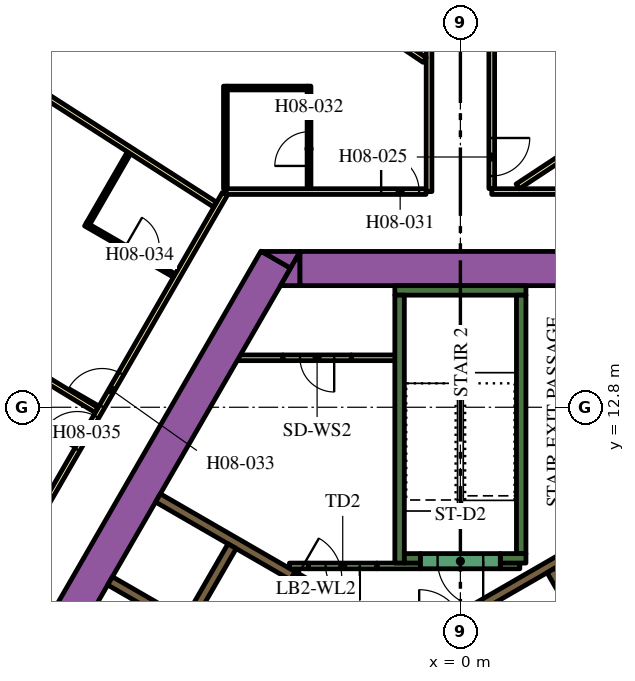
"""IFC4 building model, lengths in metres.
Left out: names, types, materials, properties, quantities, classifications, styles, units other than length and angle.
Written with IfcOpenShell. Run it as: python <this file> out.ifc"""

import sys

from ifc_helpers import new_model, si_unit, direction, frame, frame_2d, origin, place, context, subcontext, project, spatial, polyline, rectangle, outline, extrude, element, fill, save


model = new_model("IFC4")
c1 = context("Model", 3, precision=1e-05, world=origin(), true_north=direction((0.0, 1.0)))
c2 = subcontext(c1, "Body", "Model", "MODEL_VIEW")
j1 = project(units=[si_unit("LENGTHUNIT", "METRE"), si_unit("PLANEANGLEUNIT", "RADIAN")], contexts=[c1])
p1 = place(None, origin())
s1 = spatial("IfcSite", under=j1, at=p1, CompositionType="ELEMENT")
p2 = place(p1, origin())
s2 = spatial("IfcBuilding", under=s1, at=p2, CompositionType="ELEMENT")
p3 = place(p2, frame((0.0, 0.0, 111.0)))
s3 = spatial("IfcBuildingStorey", under=s2, at=p3, CompositionType="ELEMENT", Elevation=111.0)
p4 = place(p3, frame((-15.36, -1.503, 0.0), z_axis=(0.0, 0.0, 1.0), x_axis=(0.50000389221, 0.866023156604, 0.0)))
e1 = element("IfcWall", 1, at=p4, inside=s3, PredefinedType="SOLIDWALL", context=c2, shape_type="SweptSolid", body=[
    extrude(rectangle(XDim=21.0, YDim=0.9, at=frame_2d((10.5, 0.0))), origin(), (0.0, 0.0, 1.0), 3.9),
])
p5 = place(p3, origin())
e2 = element("IfcWall", 2, at=p5, inside=s3, PredefinedType="SOLIDWALL", context=c2, shape_type="SweptSolid", body=[
    extrude(outline(polyline([(-4.215, 16.9), (-4.469, 16.46), (-5.231, 16.9), (-4.215, 16.9)])), origin(), (0.0, 0.0, 1.0), 3.9),
])
p6 = place(p3, frame((-4.224, 16.45, 0.0), z_axis=(0.0, 0.0, 1.0), x_axis=(1.0, 0.0, 0.0)))
e3 = element("IfcWall", 3, at=p6, inside=s3, PredefinedType="SOLIDWALL", context=c2, shape_type="SweptSolid", body=[
    extrude(rectangle(XDim=9.488, YDim=0.9, at=frame_2d((4.744, 0.0))), origin(), (0.0, 0.0, 1.0), 3.9),
])
e4 = element("IfcWall", 4, at=p5, inside=s3, PredefinedType="SOLIDWALL", context=c2, shape_type="SweptSolid", body=[
    extrude(outline(polyline([(-4.734, 16.0), (-4.226, 16.88), (-4.226, 16.0), (-4.734, 16.0)])), origin(), (0.0, 0.0, 1.0), 3.9),
])
p7 = place(p3, frame((-1.725, 15.875, 0.0), z_axis=(0.0, 0.0, 1.0), x_axis=(1.0, 0.0, 0.0)))
e5 = element("IfcWall", 5, at=p7, inside=s3, PredefinedType="SOLIDWALL", context=c2, shape_type="SweptSolid", body=[
    extrude(rectangle(XDim=3.45, YDim=0.25, at=frame_2d((1.725, 0.0))), origin(), (0.0, 0.0, 1.0), 3.9),
])
p8 = place(p3, frame((1.6, 8.95, 0.0), z_axis=(0.0, 0.0, 1.0), x_axis=(0.0, 1.0, 0.0)))
e6 = element("IfcWall", 6, at=p8, inside=s3, PredefinedType="SOLIDWALL", context=c2, shape_type="SweptSolid", body=[
    extrude(rectangle(XDim=6.8, YDim=0.25, at=frame_2d((3.4, 0.0))), origin(), (0.0, 0.0, 1.0), 3.9),
])
p9 = place(p3, frame((1.05, 8.825, 0.0), z_axis=(0.0, 0.0, 1.0), x_axis=(1.0, 0.0, 0.0)))
e7 = element("IfcWall", 7, at=p9, inside=s3, PredefinedType="SOLIDWALL", context=c2, shape_type="SweptSolid", body=[
    extrude(rectangle(XDim=0.675, YDim=0.25, at=frame_2d((0.337, 0.0))), origin(), (0.0, 0.0, 1.0), 3.9),
])
p10 = place(p3, frame((-1.6, 8.7, 0.0), z_axis=(0.0, 0.0, 1.0), x_axis=(0.0, 1.0, 0.0)))
e8 = element("IfcWall", 8, at=p10, inside=s3, PredefinedType="SOLIDWALL", context=c2, shape_type="SweptSolid", body=[
    extrude(rectangle(XDim=7.05, YDim=0.25, at=frame_2d((3.525, 0.0))), origin(), (0.0, 0.0, 1.0), 3.9),
])
p11 = place(p3, frame((-1.475, 8.825, 0.0), z_axis=(0.0, 0.0, 1.0), x_axis=(1.0, 0.0, 0.0)))
e9 = element("IfcWall", 9, at=p11, inside=s3, PredefinedType="SOLIDWALL", context=c2, shape_type="SweptSolid", body=[
    extrude(rectangle(XDim=0.425, YDim=0.25, at=frame_2d((0.212, 0.0))), origin(), (0.0, 0.0, 1.0), 3.9),
])
p12 = place(p3, frame((0.314, 7.456, 0.0), z_axis=(0.0, 0.0, 1.0), x_axis=(0.866013897511, 0.50001992892, 0.0)))
e10 = element("IfcWall", 10, at=p12, inside=s3, PredefinedType="SOLIDWALL", context=c2, shape_type="SweptSolid", body=[
    extrude(rectangle(XDim=3.268, YDim=0.25, at=frame_2d((1.634, 0.0))), origin(), (0.0, 0.0, 1.0), 3.9),
])
e11 = element("IfcWall", 11, at=p5, inside=s3, PredefinedType="SOLIDWALL", context=c2, shape_type="SweptSolid", body=[
    extrude(outline(polyline([(-3.128, 7.481), (-3.259, 7.557), (-3.134, 7.773), (-3.003, 7.698), (-3.128, 7.481)])), origin(), (0.0, 0.0, 1.0), 3.9),
])
p13 = place(p3, frame((-7.314, 7.132, 0.0), z_axis=(0.0, 0.0, 1.0), x_axis=(-0.866008176907, 0.50002983664, 0.0)))
e12 = element("IfcWall", 12, at=p13, inside=s3, PredefinedType="SOLIDWALL", context=c2, shape_type="SweptSolid", body=[
    extrude(rectangle(XDim=2.2, YDim=0.25, at=frame_2d((1.1, 0.0))), origin(), (0.0, 0.0, 1.0), 3.9),
])
p14 = place(p3, frame((-7.959, 10.415, 0.0), z_axis=(0.0, 0.0, 1.0), x_axis=(0.866020958405, -0.500007699544, 0.0)))
e13 = element("IfcWall", 13, at=p14, inside=s3, PredefinedType="SOLIDWALL", context=c2, shape_type="SweptSolid", body=[
    extrude(rectangle(XDim=4.1, YDim=0.25, at=frame_2d((2.05, 0.0))), origin(), (0.0, 0.0, 1.0), 3.9),
])
p15 = place(p3, frame((-3.997, 8.625, 0.0), z_axis=(0.0, 0.0, 1.0), x_axis=(-1.0, 0.0, 0.0)))
e14 = element("IfcWall", 14, at=p15, inside=s3, PredefinedType="PARTITIONING", context=c2, shape_type="SweptSolid", body=[
    extrude(rectangle(XDim=0.502, YDim=0.15, at=frame_2d((0.251, 0.0))), origin(), (0.0, 0.0, 1.0), 2.75),
])
p16 = place(p3, frame((-2.196, 8.625, 0.0), z_axis=(0.0, 0.0, 1.0), x_axis=(1.0, 0.0, 0.0)))
e15 = element("IfcWall", 15, at=p16, inside=s3, PredefinedType="PARTITIONING", context=c2, shape_type="SweptSolid", body=[
    extrude(rectangle(XDim=1.146, YDim=0.15, at=frame_2d((0.573, 0.0))), origin(), (0.0, 0.0, 1.0), 2.75),
])
p17 = place(p3, frame((-5.851, 14.102, 0.0), z_axis=(0.0, 0.0, 1.0), x_axis=(1.0, 0.0, 0.0)))
e16 = element("IfcWall", 16, at=p17, inside=s3, PredefinedType="PARTITIONING", context=c2, shape_type="SweptSolid", body=[
    extrude(rectangle(XDim=1.18, YDim=0.15, at=frame_2d((0.59, 0.0))), origin(), (0.0, 0.0, 1.0), 2.75),
])
p18 = place(p3, frame((-2.871, 14.102, 0.0), z_axis=(0.0, 0.0, 1.0), x_axis=(1.0, 0.0, 0.0)))
e17 = element("IfcWall", 17, at=p18, inside=s3, PredefinedType="PARTITIONING", context=c2, shape_type="SweptSolid", body=[
    extrude(rectangle(XDim=1.196, YDim=0.15, at=frame_2d((0.598, 0.0))), origin(), (0.0, 0.0, 1.0), 2.75),
])
p19 = place(p3, frame((1.05, 8.625, 0.0), z_axis=(0.0, 0.0, 1.0), x_axis=(1.0, 0.0, 0.0)))
e18 = element("IfcWall", 18, at=p19, inside=s3, PredefinedType="PARTITIONING", context=c2, shape_type="SweptSolid", body=[
    extrude(rectangle(XDim=0.514, YDim=0.15, at=frame_2d((0.257, 0.0))), origin(), (0.0, 0.0, 1.0), 2.75),
])
p20 = place(p3, frame((8.565, -2.185, 0.0), z_axis=(0.0, 0.0, 1.0), x_axis=(-0.499997954832, 0.866026584559, 0.0)))
e19 = element("IfcWall", 19, at=p20, inside=s3, PredefinedType="SOLIDWALL", context=c2, shape_type="SweptSolid", body=[
    extrude(rectangle(XDim=12.35, YDim=0.25, at=frame_2d((6.175, 0.0))), origin(), (0.0, 0.0, 1.0), 3.9),
])
p21 = place(p20, frame((5.725, 0.0, 0.0)))
e20 = element("IfcOpeningElement", 20, at=p21, cuts=e19, PredefinedType="OPENING", context=c2, shape_type="SweptSolid", body=[
    extrude(rectangle(XDim=0.9, YDim=2.1, at=frame_2d((0.45, 1.05))), frame((0.0, 0.135, 0.0), z_axis=(0.0, -1.0, 0.0), x_axis=(1.0, 0.0, 0.0)), (0.0, 0.0, 1.0), 0.27),
])
p22 = place(p3, frame((-6.008, 9.144, 0.0), z_axis=(0.0, 0.0, 1.0), x_axis=(-0.500006956611, -0.866021387346, 0.0)))
e21 = element("IfcWall", 21, at=p22, inside=s3, PredefinedType="SOLIDWALL", context=c2, shape_type="SweptSolid", body=[
    extrude(rectangle(XDim=9.83, YDim=0.25, at=frame_2d((4.915, 0.0))), origin(), (0.0, 0.0, 1.0), 3.9),
])
p23 = place(p22, frame((6.985, 0.0, 0.0)))
e22 = element("IfcOpeningElement", 22, at=p23, cuts=e21, PredefinedType="OPENING", context=c2, shape_type="SweptSolid", body=[
    extrude(rectangle(XDim=0.9, YDim=2.1, at=frame_2d((0.45, 1.05))), frame((0.0, 0.135, 0.0), z_axis=(0.0, -1.0, 0.0), x_axis=(1.0, 0.0, 0.0)), (0.0, 0.0, 1.0), 0.27),
])
p24 = place(p3, frame((1.05, 8.75, 0.0), z_axis=(0.0, 0.0, 1.0), x_axis=(-1.0, 0.0, 0.0)))
e23 = element("IfcWall", 23, at=p24, inside=s3, PredefinedType="SOLIDWALL", context=c2, shape_type="SweptSolid", body=[
    extrude(rectangle(XDim=2.1, YDim=0.4, at=frame_2d((1.05, 0.0))), origin(), (0.0, 0.0, 1.0), 3.9),
])
p25 = place(p24, frame((0.45, 0.0, 0.0)))
e24 = element("IfcOpeningElement", 24, at=p25, cuts=e23, PredefinedType="OPENING", context=c2, shape_type="SweptSolid", body=[
    extrude(rectangle(XDim=1.2, YDim=2.1, at=frame_2d((0.6, 1.05))), frame((0.0, 0.21, 0.0), z_axis=(0.0, -1.0, 0.0), x_axis=(1.0, 0.0, 0.0)), (0.0, 0.0, 1.0), 0.42),
])
p26 = place(p3, frame((-2.196, 8.625, 0.0), z_axis=(0.0, 0.0, 1.0), x_axis=(-1.0, 0.0, 0.0)))
e25 = element("IfcWall", 25, at=p26, inside=s3, PredefinedType="PARTITIONING", context=c2, shape_type="SweptSolid", body=[
    extrude(rectangle(XDim=1.8, YDim=0.15, at=frame_2d((0.9, 0.0))), origin(), (0.0, 0.0, 1.0), 2.75),
])
p27 = place(p26, frame((0.45, 0.0, 0.0)))
e26 = element("IfcOpeningElement", 26, at=p27, cuts=e25, PredefinedType="OPENING", context=c2, shape_type="SweptSolid", body=[
    extrude(rectangle(XDim=0.9, YDim=2.1, at=frame_2d((0.45, 1.05))), frame((0.0, 0.085, 0.0), z_axis=(0.0, -1.0, 0.0), x_axis=(1.0, 0.0, 0.0)), (0.0, 0.0, 1.0), 0.17),
])
p28 = place(p3, frame((-4.409, 8.365, 0.0), z_axis=(0.0, 0.0, 1.0), x_axis=(0.866034573852, -0.49998411664, 0.0)))
e27 = element("IfcWall", 27, at=p28, inside=s3, PredefinedType="SOLIDWALL", context=c2, shape_type="SweptSolid", body=[
    extrude(rectangle(XDim=1.4, YDim=0.25, at=frame_2d((0.7, 0.0))), origin(), (0.0, 0.0, 1.0), 3.9),
])
p29 = place(p28, frame((0.1, 0.0, 0.0)))
e28 = element("IfcOpeningElement", 28, at=p29, cuts=e27, PredefinedType="OPENING", context=c2, shape_type="SweptSolid", body=[
    extrude(rectangle(XDim=1.2, YDim=2.1, at=frame_2d((0.6, 1.05))), frame((0.0, 0.135, 0.0), z_axis=(0.0, -1.0, 0.0), x_axis=(1.0, 0.0, 0.0)), (0.0, 0.0, 1.0), 0.27),
])
p30 = place(p3, frame((-2.871, 14.102, 0.0), z_axis=(0.0, 0.0, 1.0), x_axis=(-1.0, 0.0, 0.0)))
e29 = element("IfcWall", 29, at=p30, inside=s3, PredefinedType="PARTITIONING", context=c2, shape_type="SweptSolid", body=[
    extrude(rectangle(XDim=1.8, YDim=0.15, at=frame_2d((0.9, 0.0))), origin(), (0.0, 0.0, 1.0), 2.75),
])
p31 = place(p30, frame((0.45, 0.0, 0.0)))
e30 = element("IfcOpeningElement", 30, at=p31, cuts=e29, PredefinedType="OPENING", context=c2, shape_type="SweptSolid", body=[
    extrude(rectangle(XDim=0.9, YDim=2.1, at=frame_2d((0.45, 1.05))), frame((0.0, 0.085, 0.0), z_axis=(0.0, -1.0, 0.0), x_axis=(1.0, 0.0, 0.0)), (0.0, 0.0, 1.0), 0.17),
])
p32 = place(p3, frame((0.825, 18.475, 0.0), z_axis=(0.0, 0.0, 1.0), x_axis=(1.0, 0.0, 0.0)))
e31 = element("IfcWall", 31, at=p32, inside=s3, PredefinedType="PARTITIONING", context=c2, shape_type="SweptSolid", body=[
    extrude(rectangle(XDim=5.268, YDim=0.15, at=frame_2d((2.634, 0.0))), origin(), (0.0, 0.0, 1.0), 2.75),
])
p33 = place(p3, frame((0.825, 32.098, 0.0), z_axis=(0.0, 0.0, 1.0), x_axis=(0.0, -1.0, 0.0)))
e32 = element("IfcWall", 32, at=p33, inside=s3, PredefinedType="PARTITIONING", context=c2, shape_type="SweptSolid", body=[
    extrude(rectangle(XDim=13.543, YDim=0.15, at=frame_2d((6.772, 0.0))), origin(), (0.0, 0.0, 1.0), 2.75),
])
p34 = place(p33, frame((12.213, 0.0, 0.0)))
e33 = element("IfcOpeningElement", 33, at=p34, cuts=e32, PredefinedType="OPENING", context=c2, shape_type="SweptSolid", body=[
    extrude(rectangle(XDim=1.0, YDim=2.1, at=frame_2d((0.5, 1.05))), frame((0.0, 0.085, 0.0), z_axis=(0.0, -1.0, 0.0), x_axis=(1.0, 0.0, 0.0)), (0.0, 0.0, 1.0), 0.17),
])
p35 = place(p33, frame((4.65, 0.0, 0.0)))
e34 = element("IfcOpeningElement", 34, at=p35, cuts=e32, PredefinedType="OPENING", context=c2, shape_type="SweptSolid", body=[
    extrude(rectangle(XDim=1.0, YDim=2.1, at=frame_2d((0.5, 1.05))), frame((0.0, 0.085, 0.0), z_axis=(0.0, -1.0, 0.0), x_axis=(1.0, 0.0, 0.0)), (0.0, 0.0, 1.0), 0.17),
])
p36 = place(p3, frame((-0.825, 18.475, 0.0), z_axis=(0.0, 0.0, 1.0), x_axis=(0.0, 1.0, 0.0)))
e35 = element("IfcWall", 35, at=p36, inside=s3, PredefinedType="PARTITIONING", context=c2, shape_type="SweptSolid", body=[
    extrude(rectangle(XDim=13.623, YDim=0.15, at=frame_2d((6.812, 0.0))), origin(), (0.0, 0.0, 1.0), 2.75),
])
p37 = place(p36, frame((4.135, 0.0, 0.0)))
e36 = element("IfcOpeningElement", 36, at=p37, cuts=e35, PredefinedType="OPENING", context=c2, shape_type="SweptSolid", body=[
    extrude(rectangle(XDim=1.1, YDim=2.1, at=frame_2d((0.55, 1.05))), frame((0.0, 0.085, 0.0), z_axis=(0.0, -1.0, 0.0), x_axis=(1.0, 0.0, 0.0)), (0.0, 0.0, 1.0), 0.17),
])
p38 = place(p3, frame((-6.163, 18.475, 0.0), z_axis=(0.0, 0.0, 1.0), x_axis=(1.0, 0.0, 0.0)))
e37 = element("IfcWall", 37, at=p38, inside=s3, PredefinedType="PARTITIONING", context=c2, shape_type="SweptSolid", body=[
    extrude(rectangle(XDim=5.258, YDim=0.15, at=frame_2d((2.629, 0.0))), origin(), (0.0, 0.0, 1.0), 2.75),
])
p39 = place(p38, frame((4.078, 0.0, 0.0)))
e38 = element("IfcOpeningElement", 38, at=p39, cuts=e37, PredefinedType="OPENING", context=c2, shape_type="SweptSolid", body=[
    extrude(rectangle(XDim=1.0, YDim=2.1, at=frame_2d((0.5, 1.05))), frame((0.0, 0.085, 0.0), z_axis=(0.0, -1.0, 0.0), x_axis=(1.0, 0.0, 0.0)), (0.0, 0.0, 1.0), 0.17),
])
p40 = place(p3, frame((-19.081, -3.9, 0.0), z_axis=(0.0, 0.0, 1.0), x_axis=(0.499998313975, 0.866026377209, 0.0)))
e39 = element("IfcWall", 39, at=p40, inside=s3, PredefinedType="PARTITIONING", context=c2, shape_type="SweptSolid", body=[
    extrude(rectangle(XDim=25.766, YDim=0.15, at=frame_2d((12.883, 0.0))), origin(), (0.0, 0.0, 1.0), 2.75),
])
p41 = place(p40, frame((19.306, 0.0, 0.0)))
e40 = element("IfcOpeningElement", 40, at=p41, cuts=e39, PredefinedType="OPENING", context=c2, shape_type="SweptSolid", body=[
    extrude(rectangle(XDim=1.0, YDim=2.1, at=frame_2d((0.5, 1.05))), frame((0.0, 0.085, 0.0), z_axis=(0.0, -1.0, 0.0), x_axis=(1.0, 0.0, 0.0)), (0.0, 0.0, 1.0), 0.17),
])
p42 = place(p40, frame((18.0, 0.0, 0.0)))
e41 = element("IfcOpeningElement", 41, at=p42, cuts=e39, PredefinedType="OPENING", context=c2, shape_type="SweptSolid", body=[
    extrude(rectangle(XDim=1.0, YDim=2.1, at=frame_2d((0.5, 1.05))), frame((0.0, 0.085, 0.0), z_axis=(0.0, -1.0, 0.0), x_axis=(1.0, 0.0, 0.0)), (0.0, 0.0, 1.0), 0.17),
])
p43 = place(p40, frame((6.838, 0.0, 0.0)))
e42 = element("IfcOpeningElement", 42, at=p43, cuts=e39, PredefinedType="OPENING", context=c2, shape_type="SweptSolid", body=[
    extrude(rectangle(XDim=1.0, YDim=2.1, at=frame_2d((0.5, 1.05))), frame((0.0, 0.085, 0.0), z_axis=(0.0, -1.0, 0.0), x_axis=(1.0, 0.0, 0.0)), (0.0, 0.0, 1.0), 0.17),
])
p44 = place(p40, frame((4.674, 0.0, 0.0)))
e43 = element("IfcOpeningElement", 43, at=p44, cuts=e39, PredefinedType="OPENING", context=c2, shape_type="SweptSolid", body=[
    extrude(rectangle(XDim=0.9, YDim=2.1, at=frame_2d((0.45, 1.05))), frame((0.0, 0.085, 0.0), z_axis=(0.0, -1.0, 0.0), x_axis=(1.0, 0.0, 0.0)), (0.0, 0.0, 1.0), 0.17),
])
p45 = place(p40, frame((0.18, 0.0, 0.0)))
e44 = element("IfcOpeningElement", 44, at=p45, cuts=e39, PredefinedType="OPENING", context=c2, shape_type="SweptSolid", body=[
    extrude(rectangle(XDim=1.0, YDim=2.1, at=frame_2d((0.5, 1.05))), frame((0.0, 0.085, 0.0), z_axis=(0.0, -1.0, 0.0), x_axis=(1.0, 0.0, 0.0)), (0.0, 0.0, 1.0), 0.17),
])
p46 = place(p3, frame((-15.225, 16.167, 0.0), z_axis=(0.0, 0.0, 1.0), x_axis=(0.854088713274, -0.520127359266, 0.0)))
e45 = element("IfcWall", 45, at=p46, inside=s3, PredefinedType="PARTITIONING", context=c2, shape_type="SweptSolid", body=[
    extrude(rectangle(XDim=6.611, YDim=0.15, at=frame_2d((3.305, 0.0))), origin(), (0.0, 0.0, 1.0), 2.75),
])
p47 = place(p3, frame((-11.838, 21.585, 0.0), z_axis=(0.0, 0.0, 1.0), x_axis=(0.841699322813, -0.539946525108, 0.0)))
e46 = element("IfcWall", 46, at=p47, inside=s3, PredefinedType="PARTITIONING", context=c2, shape_type="SweptSolid", body=[
    extrude(rectangle(XDim=6.392, YDim=0.15, at=frame_2d((3.196, 0.0))), origin(), (0.0, 0.0, 1.0), 2.75),
])
p48 = place(p3, frame((-8.326, 26.923, 0.0), z_axis=(0.0, 0.0, 1.0), x_axis=(0.828836601893, -0.5594907393, 0.0)))
e47 = element("IfcWall", 47, at=p48, inside=s3, PredefinedType="PARTITIONING", context=c2, shape_type="SweptSolid", body=[
    extrude(rectangle(XDim=8.909, YDim=0.15, at=frame_2d((4.455, 0.0))), origin(), (0.0, 0.0, 1.0), 2.75),
])
p49 = place(p3, frame((10.592, 24.589, 0.0), z_axis=(0.0, 0.0, 1.0), x_axis=(-0.835337323748, -0.549737715236, 0.0)))
e48 = element("IfcWall", 48, at=p49, inside=s3, PredefinedType="PARTITIONING", context=c2, shape_type="SweptSolid", body=[
    extrude(rectangle(XDim=10.875, YDim=0.15, at=frame_2d((5.438, 0.0))), origin(), (0.0, 0.0, 1.0), 2.75),
])
p50 = place(p3, frame((-3.983, 18.55, 0.0), z_axis=(0.0, 0.0, 1.0), x_axis=(0.0, 1.0, 0.0)))
e49 = element("IfcWall", 49, at=p50, inside=s3, PredefinedType="PARTITIONING", context=c2, shape_type="SweptSolid", body=[
    extrude(rectangle(XDim=2.7, YDim=0.1, at=frame_2d((1.35, 0.0))), origin(), (0.0, 0.0, 1.0), 2.75),
])
p51 = place(p50, frame((0.6, 0.0, 0.0)))
e50 = element("IfcOpeningElement", 50, at=p51, cuts=e49, PredefinedType="OPENING", context=c2, shape_type="SweptSolid", body=[
    extrude(rectangle(XDim=0.9, YDim=2.1, at=frame_2d((0.45, 1.05))), frame((0.0, 0.06, 0.0), z_axis=(0.0, -1.0, 0.0), x_axis=(1.0, 0.0, 0.0)), (0.0, 0.0, 1.0), 0.12),
])
p52 = place(p3, frame((-4.033, 21.2, 0.0), z_axis=(0.0, 0.0, 1.0), x_axis=(-1.0, 0.0, 0.0)))
e51 = element("IfcWall", 51, at=p52, inside=s3, PredefinedType="PARTITIONING", context=c2, shape_type="SweptSolid", body=[
    extrude(rectangle(XDim=2.1, YDim=0.1, at=frame_2d((1.05, 0.0))), origin(), (0.0, 0.0, 1.0), 2.75),
])
p53 = place(p3, frame((-6.183, 18.55, 0.0), z_axis=(0.0, 0.0, 1.0), x_axis=(0.0, 1.0, 0.0)))
e52 = element("IfcWall", 52, at=p53, inside=s3, PredefinedType="PARTITIONING", context=c2, shape_type="SweptSolid", body=[
    extrude(rectangle(XDim=2.7, YDim=0.1, at=frame_2d((1.35, 0.0))), origin(), (0.0, 0.0, 1.0), 2.75),
])
p54 = place(p3, frame((-9.864, 17.615, 0.0), z_axis=(0.0, 0.0, 1.0), x_axis=(0.866019956843, -0.50000943426, 0.0)))
e53 = element("IfcWall", 53, at=p54, inside=s3, PredefinedType="PARTITIONING", context=c2, shape_type="SweptSolid", body=[
    extrude(rectangle(XDim=2.7, YDim=0.1, at=frame_2d((1.35, 0.0))), origin(), (0.0, 0.0, 1.0), 2.75),
])
p55 = place(p54, frame((1.2, 0.0, 0.0)))
e54 = element("IfcOpeningElement", 54, at=p55, cuts=e53, PredefinedType="OPENING", context=c2, shape_type="SweptSolid", body=[
    extrude(rectangle(XDim=0.9, YDim=2.1, at=frame_2d((0.45, 1.05))), frame((0.0, 0.06, 0.0), z_axis=(0.0, -1.0, 0.0), x_axis=(1.0, 0.0, 0.0)), (0.0, 0.0, 1.0), 0.12),
])
p56 = place(p3, frame((-9.796, 17.633, 0.0), z_axis=(0.0, 0.0, 1.0), x_axis=(0.499961633463, 0.866047553582, 0.0)))
e55 = element("IfcWall", 55, at=p56, inside=s3, PredefinedType="PARTITIONING", context=c2, shape_type="SweptSolid", body=[
    extrude(rectangle(XDim=2.15, YDim=0.1, at=frame_2d((1.075, 0.0))), origin(), (0.0, 0.0, 1.0), 2.75),
])
p57 = place(p25, origin())
e56 = element("IfcDoor", 56, at=p57, inside=s3, OperationType="SINGLE_SWING_LEFT", PredefinedType="DOOR", context=c2, shape_type="SweptSolid", body=[
    extrude(rectangle(XDim=1.2, YDim=2.1, at=frame_2d((0.6, 1.05))), frame((0.0, 0.025, 0.0), z_axis=(0.0, -1.0, 0.0), x_axis=(1.0, 0.0, 0.0)), (0.0, 0.0, 1.0), 0.05),
])
fill(e24, e56)
p58 = place(p27, origin())
e57 = element("IfcDoor", 57, at=p58, inside=s3, OperationType="SINGLE_SWING_LEFT", PredefinedType="DOOR", context=c2, shape_type="SweptSolid", body=[
    extrude(rectangle(XDim=0.9, YDim=2.1, at=frame_2d((0.45, 1.05))), frame((0.0, 0.025, 0.0), z_axis=(0.0, -1.0, 0.0), x_axis=(1.0, 0.0, 0.0)), (0.0, 0.0, 1.0), 0.05),
])
fill(e26, e57)
p59 = place(p29, origin())
e58 = element("IfcDoor", 58, at=p59, inside=s3, OperationType="SINGLE_SWING_LEFT", PredefinedType="DOOR", context=c2, shape_type="SweptSolid", body=[
    extrude(rectangle(XDim=1.2, YDim=2.1, at=frame_2d((0.6, 1.05))), frame((0.0, 0.025, 0.0), z_axis=(0.0, -1.0, 0.0), x_axis=(1.0, 0.0, 0.0)), (0.0, 0.0, 1.0), 0.05),
])
fill(e28, e58)
p60 = place(p31, origin())
e59 = element("IfcDoor", 59, at=p60, inside=s3, OperationType="SINGLE_SWING_LEFT", PredefinedType="DOOR", context=c2, shape_type="SweptSolid", body=[
    extrude(rectangle(XDim=0.9, YDim=2.1, at=frame_2d((0.45, 1.05))), frame((0.0, 0.025, 0.0), z_axis=(0.0, -1.0, 0.0), x_axis=(1.0, 0.0, 0.0)), (0.0, 0.0, 1.0), 0.05),
])
fill(e30, e59)
p61 = place(p34, origin())
e60 = element("IfcDoor", 60, at=p61, inside=s3, OperationType="SINGLE_SWING_RIGHT", PredefinedType="DOOR", context=c2, shape_type="SweptSolid", body=[
    extrude(rectangle(XDim=1.0, YDim=2.1, at=frame_2d((0.5, 1.05))), frame((0.0, 0.025, 0.0), z_axis=(0.0, -1.0, 0.0), x_axis=(1.0, 0.0, 0.0)), (0.0, 0.0, 1.0), 0.05),
])
fill(e33, e60)
p62 = place(p39, origin())
e61 = element("IfcDoor", 61, at=p62, inside=s3, OperationType="SINGLE_SWING_RIGHT", PredefinedType="DOOR", context=c2, shape_type="SweptSolid", body=[
    extrude(rectangle(XDim=1.0, YDim=2.1, at=frame_2d((0.5, 1.05))), frame((0.0, 0.025, 0.0), z_axis=(0.0, -1.0, 0.0), x_axis=(1.0, 0.0, 0.0)), (0.0, 0.0, 1.0), 0.05),
])
fill(e38, e61)
p63 = place(p51, origin())
e62 = element("IfcDoor", 62, at=p63, inside=s3, OperationType="SINGLE_SWING_RIGHT", PredefinedType="DOOR", context=c2, shape_type="SweptSolid", body=[
    extrude(rectangle(XDim=0.9, YDim=2.1, at=frame_2d((0.45, 1.05))), frame((0.0, 0.025, 0.0), z_axis=(0.0, -1.0, 0.0), x_axis=(1.0, 0.0, 0.0)), (0.0, 0.0, 1.0), 0.05),
])
fill(e50, e62)
p64 = place(p41, origin())
e63 = element("IfcDoor", 63, at=p64, inside=s3, OperationType="SINGLE_SWING_LEFT", PredefinedType="DOOR", context=c2, shape_type="SweptSolid", body=[
    extrude(rectangle(XDim=1.0, YDim=2.1, at=frame_2d((0.5, 1.05))), frame((0.0, 0.025, 0.0), z_axis=(0.0, -1.0, 0.0), x_axis=(1.0, 0.0, 0.0)), (0.0, 0.0, 1.0), 0.05),
])
fill(e40, e63)
p65 = place(p55, origin())
e64 = element("IfcDoor", 64, at=p65, inside=s3, OperationType="SINGLE_SWING_LEFT", PredefinedType="DOOR", context=c2, shape_type="SweptSolid", body=[
    extrude(rectangle(XDim=0.9, YDim=2.1, at=frame_2d((0.45, 1.05))), frame((0.0, 0.025, 0.0), z_axis=(0.0, -1.0, 0.0), x_axis=(1.0, 0.0, 0.0)), (0.0, 0.0, 1.0), 0.05),
])
fill(e54, e64)
p66 = place(p42, origin())
e65 = element("IfcDoor", 65, at=p66, inside=s3, OperationType="SINGLE_SWING_RIGHT", PredefinedType="DOOR", context=c2, shape_type="SweptSolid", body=[
    extrude(rectangle(XDim=1.0, YDim=2.1, at=frame_2d((0.5, 1.05))), frame((0.0, 0.025, 0.0), z_axis=(0.0, -1.0, 0.0), x_axis=(1.0, 0.0, 0.0)), (0.0, 0.0, 1.0), 0.05),
])
fill(e41, e65)
save(model, sys.argv[1])
